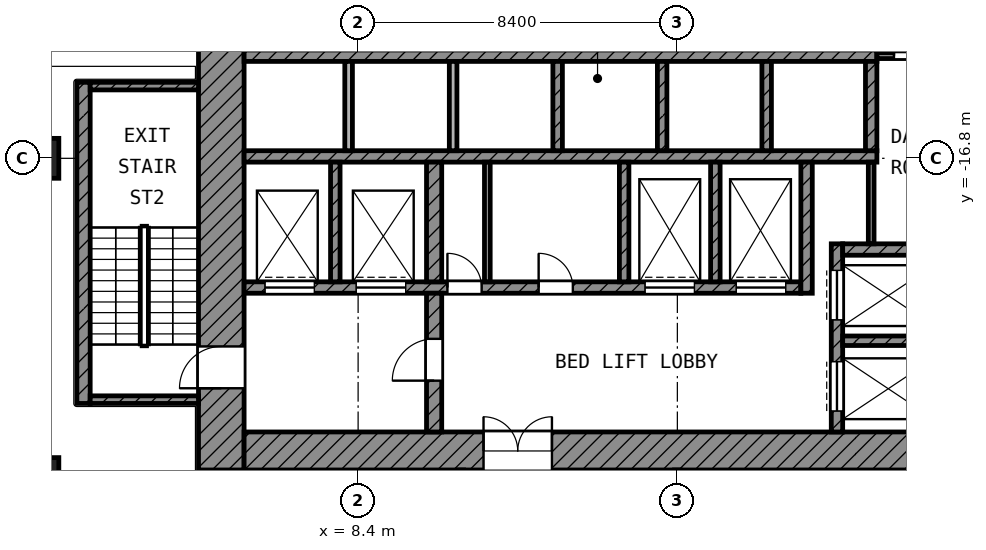
"""IFC4 building model, lengths in metres.
Left out: names, types, materials, properties, quantities, classifications, styles, units other than length and angle.
Written with IfcOpenShell. Run it as: python <this file> out.ifc"""

import sys

from ifc_helpers import new_model, si_unit, direction, frame, frame_2d, origin, origin_2d, place, context, subcontext, project, spatial, rectangle, extrude, element, fill, save


model = new_model("IFC4")
c1 = context("Model", 3, precision=1e-05, world=origin(), true_north=direction((0.0, 1.0)))
c2 = subcontext(c1, "Body", "Model", "MODEL_VIEW")
j1 = project(units=[si_unit("LENGTHUNIT", "METRE"), si_unit("PLANEANGLEUNIT", "RADIAN")], contexts=[c1])
p1 = place(None, origin())
s1 = spatial("IfcSite", under=j1, at=p1, CompositionType="ELEMENT")
p2 = place(p1, origin())
s2 = spatial("IfcBuilding", under=s1, at=p2, CompositionType="ELEMENT")
p3 = place(p2, frame((0.0, 0.0, 107.2)))
s3 = spatial("IfcBuildingStorey", under=s2, at=p3, CompositionType="ELEMENT", Elevation=107.2)
for number, where, z_axis, x_axis in (
    (1, (0.0, -16.8, 0.0), (0.0, 0.0, 1.0), (1.0, 0.0, 0.0)),
    (2, (0.0, -25.2, 0.0), (0.0, 0.0, 1.0), (1.0, 0.0, 0.0)),
):
    element("IfcColumn", number, at=place(p3, frame(where, z_axis=z_axis, x_axis=x_axis)), inside=s3, PredefinedType="COLUMN", context=c2, shape_type="SweptSolid", body=[
        extrude(rectangle(XDim=1.05, YDim=1.05, at=origin_2d()), origin(), (0.0, 0.0, 1.0), 4.2),
    ])
p4 = place(p3, frame((4.8, -25.0, 0.0), z_axis=(0.0, 0.0, 1.0), x_axis=(0.0, 1.0, 0.0)))
e3 = element("IfcWall", 3, at=p4, inside=s3, PredefinedType="SHEAR", context=c2, shape_type="SweptSolid", body=[
    extrude(rectangle(XDim=19.6, YDim=1.2, at=frame_2d((9.8, 0.0))), origin(), (0.0, 0.0, 1.0), 3.6),
])
p5 = place(p4, frame((11.45, 0.0, 0.0)))
e4 = element("IfcOpeningElement", 4, at=p5, cuts=e3, PredefinedType="OPENING", context=c2, shape_type="SweptSolid", body=[
    extrude(rectangle(XDim=1.1, YDim=2.1, at=frame_2d((0.55, 1.05))), frame((0.0, 0.61, 0.0), z_axis=(0.0, -1.0, 0.0), x_axis=(1.0, 0.0, 0.0)), (0.0, 0.0, 1.0), 1.22),
])
p6 = place(p4, frame((2.15, 0.0, 0.0)))
e5 = element("IfcOpeningElement", 5, at=p6, cuts=e3, PredefinedType="OPENING", context=c2, shape_type="SweptSolid", body=[
    extrude(rectangle(XDim=1.1, YDim=2.1, at=frame_2d((0.55, 1.05))), frame((0.0, 0.61, 0.0), z_axis=(0.0, -1.0, 0.0), x_axis=(1.0, 0.0, 0.0)), (0.0, 0.0, 1.0), 1.22),
])
p7 = place(p3, frame((5.4, -24.5, 0.0), z_axis=(0.0, 0.0, 1.0), x_axis=(1.0, 0.0, 0.0)))
e6 = element("IfcWall", 6, at=p7, inside=s3, PredefinedType="SHEAR", context=c2, shape_type="SweptSolid", body=[
    extrude(rectangle(XDim=18.6, YDim=1.0, at=frame_2d((9.3, 0.0))), origin(), (0.0, 0.0, 1.0), 3.6),
])
p8 = place(p7, frame((6.3, 0.0, 0.0)))
e7 = element("IfcOpeningElement", 7, at=p8, cuts=e6, PredefinedType="OPENING", context=c2, shape_type="SweptSolid", body=[
    extrude(rectangle(XDim=1.8, YDim=2.1, at=frame_2d((0.9, 1.05))), frame((0.0, 0.51, 0.0), z_axis=(0.0, -1.0, 0.0), x_axis=(1.0, 0.0, 0.0)), (0.0, 0.0, 1.0), 1.02),
])
for number, where, z_axis, x_axis in (
    (8, (5.4, -14.1, 0.0), (0.0, 0.0, 1.0), (1.0, 0.0, 0.0)),
    (9, (5.4, -16.75, 0.0), (0.0, 0.0, 1.0), (1.0, 0.0, 0.0)),
):
    element("IfcWall", number, at=place(p3, frame(where, z_axis=z_axis, x_axis=x_axis)), inside=s3, PredefinedType="SHEAR", context=c2, shape_type="SweptSolid", body=[
        extrude(rectangle(XDim=16.65, YDim=0.3, at=frame_2d((8.325, 0.0))), origin(), (0.0, 0.0, 1.0), 3.6),
    ])
p9 = place(p3, frame((5.4, -20.2, 0.0), z_axis=(0.0, 0.0, 1.0), x_axis=(1.0, 0.0, 0.0)))
e10 = element("IfcWall", 10, at=p9, inside=s3, PredefinedType="SHEAR", context=c2, shape_type="SweptSolid", body=[
    extrude(rectangle(XDim=14.65, YDim=0.3, at=frame_2d((7.325, 0.0))), origin(), (0.0, 0.0, 1.0), 3.6),
])
p10 = place(p9, frame((10.55, 0.0, 0.0)))
e11 = element("IfcOpeningElement", 11, at=p10, cuts=e10, PredefinedType="OPENING", context=c2, shape_type="SweptSolid", body=[
    extrude(rectangle(XDim=1.3, YDim=2.1, at=frame_2d((0.65, 1.05))), frame((0.0, 0.16, 0.0), z_axis=(0.0, -1.0, 0.0), x_axis=(1.0, 0.0, 0.0)), (0.0, 0.0, 1.0), 0.32),
])
p11 = place(p9, frame((12.95, 0.0, 0.0)))
e12 = element("IfcOpeningElement", 12, at=p11, cuts=e10, PredefinedType="OPENING", context=c2, shape_type="SweptSolid", body=[
    extrude(rectangle(XDim=1.3, YDim=2.1, at=frame_2d((0.65, 1.05))), frame((0.0, 0.16, 0.0), z_axis=(0.0, -1.0, 0.0), x_axis=(1.0, 0.0, 0.0)), (0.0, 0.0, 1.0), 0.32),
])
p12 = place(p9, frame((0.55, 0.0, 0.0)))
e13 = element("IfcOpeningElement", 13, at=p12, cuts=e10, PredefinedType="OPENING", context=c2, shape_type="SweptSolid", body=[
    extrude(rectangle(XDim=1.3, YDim=2.1, at=frame_2d((0.65, 1.05))), frame((0.0, 0.16, 0.0), z_axis=(0.0, -1.0, 0.0), x_axis=(1.0, 0.0, 0.0)), (0.0, 0.0, 1.0), 0.32),
])
p13 = place(p9, frame((2.95, 0.0, 0.0)))
e14 = element("IfcOpeningElement", 14, at=p13, cuts=e10, PredefinedType="OPENING", context=c2, shape_type="SweptSolid", body=[
    extrude(rectangle(XDim=1.3, YDim=2.1, at=frame_2d((0.65, 1.05))), frame((0.0, 0.16, 0.0), z_axis=(0.0, -1.0, 0.0), x_axis=(1.0, 0.0, 0.0)), (0.0, 0.0, 1.0), 0.32),
])
p14 = place(p9, frame((5.35, 0.0, 0.0)))
e15 = element("IfcOpeningElement", 15, at=p14, cuts=e10, PredefinedType="OPENING", context=c2, shape_type="SweptSolid", body=[
    extrude(rectangle(XDim=0.9, YDim=2.1, at=frame_2d((0.45, 1.05))), frame((0.0, 0.16, 0.0), z_axis=(0.0, -1.0, 0.0), x_axis=(1.0, 0.0, 0.0)), (0.0, 0.0, 1.0), 0.32),
])
p15 = place(p9, frame((7.75, 0.0, 0.0)))
e16 = element("IfcOpeningElement", 16, at=p15, cuts=e10, PredefinedType="OPENING", context=c2, shape_type="SweptSolid", body=[
    extrude(rectangle(XDim=0.9, YDim=2.1, at=frame_2d((0.45, 1.05))), frame((0.0, 0.16, 0.0), z_axis=(0.0, -1.0, 0.0), x_axis=(1.0, 0.0, 0.0)), (0.0, 0.0, 1.0), 0.32),
])
p16 = place(p3, frame((10.4, -24.0, 0.0), z_axis=(0.0, 0.0, 1.0), x_axis=(0.0, 1.0, 0.0)))
e17 = element("IfcWall", 17, at=p16, inside=s3, PredefinedType="SHEAR", context=c2, shape_type="SweptSolid", body=[
    extrude(rectangle(XDim=3.65, YDim=0.4, at=frame_2d((1.825, 0.0))), origin(), (0.0, 0.0, 1.0), 3.6),
])
p17 = place(p16, frame((1.35, 0.0, 0.0)))
e18 = element("IfcOpeningElement", 18, at=p17, cuts=e17, PredefinedType="OPENING", context=c2, shape_type="SweptSolid", body=[
    extrude(rectangle(XDim=1.1, YDim=2.1, at=frame_2d((0.55, 1.05))), frame((0.0, 0.21, 0.0), z_axis=(0.0, -1.0, 0.0), x_axis=(1.0, 0.0, 0.0)), (0.0, 0.0, 1.0), 0.42),
])
p18 = place(p3, frame((10.4, -20.05, 0.0), z_axis=(0.0, 0.0, 1.0), x_axis=(0.0, 1.0, 0.0)))
e19 = element("IfcWall", 19, at=p18, inside=s3, PredefinedType="SHEAR", context=c2, shape_type="SweptSolid", body=[
    extrude(rectangle(XDim=3.15, YDim=0.4, at=frame_2d((1.575, 0.0))), origin(), (0.0, 0.0, 1.0), 3.6),
])
p19 = place(p3, frame((20.2, -20.35, 0.0), z_axis=(0.0, 0.0, 1.0), x_axis=(0.0, 1.0, 0.0)))
e20 = element("IfcWall", 20, at=p19, inside=s3, PredefinedType="SHEAR", context=c2, shape_type="SweptSolid", body=[
    extrude(rectangle(XDim=3.45, YDim=0.3, at=frame_2d((1.725, 0.0))), origin(), (0.0, 0.0, 1.0), 3.6),
])
p20 = place(p3, frame((21.9, -16.6, 0.0), z_axis=(0.0, 0.0, 1.0), x_axis=(0.0, 1.0, 0.0)))
e21 = element("IfcWall", 21, at=p20, inside=s3, PredefinedType="SHEAR", context=c2, shape_type="SweptSolid", body=[
    extrude(rectangle(XDim=2.35, YDim=0.3, at=frame_2d((1.175, 0.0))), origin(), (0.0, 0.0, 1.0), 3.6),
])
p21 = place(p3, frame((21.15, -19.2, 0.0), z_axis=(0.0, 0.0, 1.0), x_axis=(1.0, 0.0, 0.0)))
e22 = element("IfcWall", 22, at=p21, inside=s3, PredefinedType="SHEAR", context=c2, shape_type="SweptSolid", body=[
    extrude(rectangle(XDim=2.85, YDim=0.3, at=frame_2d((1.425, 0.0))), origin(), (0.0, 0.0, 1.0), 3.6),
])
p22 = place(p3, frame((21.0, -24.0, 0.0), z_axis=(0.0, 0.0, 1.0), x_axis=(0.0, 1.0, 0.0)))
e23 = element("IfcWall", 23, at=p22, inside=s3, PredefinedType="SHEAR", context=c2, shape_type="SweptSolid", body=[
    extrude(rectangle(XDim=4.95, YDim=0.3, at=frame_2d((2.475, 0.0))), origin(), (0.0, 0.0, 1.0), 3.6),
])
p23 = place(p22, frame((2.95, 0.0, 0.0)))
e24 = element("IfcOpeningElement", 24, at=p23, cuts=e23, PredefinedType="OPENING", context=c2, shape_type="SweptSolid", body=[
    extrude(rectangle(XDim=1.3, YDim=2.1, at=frame_2d((0.65, 1.05))), frame((0.0, 0.16, 0.0), z_axis=(0.0, -1.0, 0.0), x_axis=(1.0, 0.0, 0.0)), (0.0, 0.0, 1.0), 0.32),
])
p24 = place(p22, frame((0.55, 0.0, 0.0)))
e25 = element("IfcOpeningElement", 25, at=p24, cuts=e23, PredefinedType="OPENING", context=c2, shape_type="SweptSolid", body=[
    extrude(rectangle(XDim=1.3, YDim=2.1, at=frame_2d((0.65, 1.05))), frame((0.0, 0.16, 0.0), z_axis=(0.0, -1.0, 0.0), x_axis=(1.0, 0.0, 0.0)), (0.0, 0.0, 1.0), 0.32),
])
p25 = place(p3, frame((21.15, -21.6, 0.0), z_axis=(0.0, 0.0, 1.0), x_axis=(1.0, 0.0, 0.0)))
e26 = element("IfcWall", 26, at=p25, inside=s3, PredefinedType="SHEAR", context=c2, shape_type="SweptSolid", body=[
    extrude(rectangle(XDim=2.85, YDim=0.25, at=frame_2d((1.425, 0.0))), origin(), (0.0, 0.0, 1.0), 3.6),
])
for number, where, z_axis, x_axis in (
    (27, (7.8, -20.05, 0.0), (0.0, 0.0, 1.0), (0.0, 1.0, 0.0)),
    (28, (15.4, -20.05, 0.0), (0.0, 0.0, 1.0), (0.0, 1.0, 0.0)),
    (29, (17.8, -20.05, 0.0), (0.0, 0.0, 1.0), (0.0, 1.0, 0.0)),
):
    element("IfcWall", number, at=place(p3, frame(where, z_axis=z_axis, x_axis=x_axis)), inside=s3, PredefinedType="SHEAR", context=c2, shape_type="SweptSolid", body=[
        extrude(rectangle(XDim=3.15, YDim=0.25, at=frame_2d((1.575, 0.0))), origin(), (0.0, 0.0, 1.0), 3.6),
    ])
for number, where, z_axis, x_axis in (
    (30, (8.15, -16.6, 0.0), (0.0, 0.0, 1.0), (0.0, 1.0, 0.0)),
    (31, (10.9, -16.6, 0.0), (0.0, 0.0, 1.0), (0.0, 1.0, 0.0)),
):
    element("IfcWall", number, at=place(p3, frame(where, z_axis=z_axis, x_axis=x_axis)), inside=s3, PredefinedType="PARTITIONING", context=c2, shape_type="SweptSolid", body=[
        extrude(rectangle(XDim=2.35, YDim=0.2, at=frame_2d((1.175, 0.0))), origin(), (0.0, 0.0, 1.0), 3.6),
    ])
for number, where, z_axis, x_axis in (
    (32, (13.65, -16.6, 0.0), (0.0, 0.0, 1.0), (0.0, 1.0, 0.0)),
    (33, (16.4, -16.6, 0.0), (0.0, 0.0, 1.0), (0.0, 1.0, 0.0)),
    (34, (19.15, -16.6, 0.0), (0.0, 0.0, 1.0), (0.0, 1.0, 0.0)),
):
    element("IfcWall", number, at=place(p3, frame(where, z_axis=z_axis, x_axis=x_axis)), inside=s3, PredefinedType="SHEAR", context=c2, shape_type="SweptSolid", body=[
        extrude(rectangle(XDim=2.35, YDim=0.25, at=frame_2d((1.175, 0.0))), origin(), (0.0, 0.0, 1.0), 3.6),
    ])
p26 = place(p3, frame((21.9, -19.05, 0.0), z_axis=(0.0, 0.0, 1.0), x_axis=(0.0, 1.0, 0.0)))
e35 = element("IfcWall", 35, at=p26, inside=s3, PredefinedType="PARTITIONING", context=c2, shape_type="SweptSolid", body=[
    extrude(rectangle(XDim=2.15, YDim=0.15, at=frame_2d((1.075, 0.0))), origin(), (0.0, 0.0, 1.0), 3.6),
])
p27 = place(p3, frame((22.05, -14.1, 0.0), z_axis=(0.0, 0.0, 1.0), x_axis=(1.0, 0.0, 0.0)))
e36 = element("IfcWall", 36, at=p27, inside=s3, PredefinedType="PARTITIONING", context=c2, shape_type="SweptSolid", body=[
    extrude(rectangle(XDim=1.95, YDim=0.15, at=frame_2d((0.975, 0.0))), origin(), (0.0, 0.0, 1.0), 3.6),
])
p28 = place(p27, frame((0.45, 0.0, 0.0)))
e37 = element("IfcOpeningElement", 37, at=p28, cuts=e36, PredefinedType="OPENING", context=c2, shape_type="SweptSolid", body=[
    extrude(rectangle(XDim=0.9, YDim=2.1, at=frame_2d((0.45, 1.05))), frame((0.0, 0.085, 0.0), z_axis=(0.0, -1.0, 0.0), x_axis=(1.0, 0.0, 0.0)), (0.0, 0.0, 1.0), 0.17),
])
p29 = place(p3, frame((11.8, -20.05, 0.0), z_axis=(0.0, 0.0, 1.0), x_axis=(0.0, 1.0, 0.0)))
e38 = element("IfcWall", 38, at=p29, inside=s3, PredefinedType="PARTITIONING", context=c2, shape_type="SweptSolid", body=[
    extrude(rectangle(XDim=3.15, YDim=0.15, at=frame_2d((1.575, 0.0))), origin(), (0.0, 0.0, 1.0), 3.6),
])
p30 = place(p3, frame((1.175, -23.25, 0.0), z_axis=(0.0, 0.0, 1.0), x_axis=(0.0, 1.0, 0.0)))
e39 = element("IfcWall", 39, at=p30, inside=s3, PredefinedType="SHEAR", context=c2, shape_type="SweptSolid", body=[
    extrude(rectangle(XDim=8.45, YDim=0.35, at=frame_2d((4.225, 0.0))), origin(), (0.0, 0.0, 1.0), 3.6),
])
for number, where, z_axis, x_axis in (
    (40, (1.35, -14.9, 0.0), (0.0, 0.0, 1.0), (1.0, 0.0, 0.0)),
    (41, (1.35, -23.15, 0.0), (0.0, 0.0, 1.0), (1.0, 0.0, 0.0)),
):
    element("IfcWall", number, at=place(p3, frame(where, z_axis=z_axis, x_axis=x_axis)), inside=s3, PredefinedType="SHEAR", context=c2, shape_type="SweptSolid", body=[
        extrude(rectangle(XDim=2.85, YDim=0.2, at=frame_2d((1.425, 0.0))), origin(), (0.0, 0.0, 1.0), 3.6),
    ])
p31 = place(p23, origin())
e42 = element("IfcDoor", 42, at=p31, inside=s3, OperationType="DOUBLE_DOOR_SLIDING", PredefinedType="DOOR", context=c2, shape_type="SweptSolid", body=[
    extrude(rectangle(XDim=1.3, YDim=2.1, at=frame_2d((0.65, 1.05))), frame((0.0, 0.025, 0.0), z_axis=(0.0, -1.0, 0.0), x_axis=(1.0, 0.0, 0.0)), (0.0, 0.0, 1.0), 0.05),
])
fill(e24, e42)
p32 = place(p24, origin())
e43 = element("IfcDoor", 43, at=p32, inside=s3, OperationType="DOUBLE_DOOR_SLIDING", PredefinedType="DOOR", context=c2, shape_type="SweptSolid", body=[
    extrude(rectangle(XDim=1.3, YDim=2.1, at=frame_2d((0.65, 1.05))), frame((0.0, 0.025, 0.0), z_axis=(0.0, -1.0, 0.0), x_axis=(1.0, 0.0, 0.0)), (0.0, 0.0, 1.0), 0.05),
])
fill(e25, e43)
p33 = place(p10, origin())
e44 = element("IfcDoor", 44, at=p33, inside=s3, OperationType="DOUBLE_DOOR_SLIDING", PredefinedType="DOOR", context=c2, shape_type="SweptSolid", body=[
    extrude(rectangle(XDim=1.3, YDim=2.1, at=frame_2d((0.65, 1.05))), frame((0.0, 0.025, 0.0), z_axis=(0.0, -1.0, 0.0), x_axis=(1.0, 0.0, 0.0)), (0.0, 0.0, 1.0), 0.05),
])
fill(e11, e44)
p34 = place(p11, origin())
e45 = element("IfcDoor", 45, at=p34, inside=s3, OperationType="DOUBLE_DOOR_SLIDING", PredefinedType="DOOR", context=c2, shape_type="SweptSolid", body=[
    extrude(rectangle(XDim=1.3, YDim=2.1, at=frame_2d((0.65, 1.05))), frame((0.0, 0.025, 0.0), z_axis=(0.0, -1.0, 0.0), x_axis=(1.0, 0.0, 0.0)), (0.0, 0.0, 1.0), 0.05),
])
fill(e12, e45)
p35 = place(p12, origin())
e46 = element("IfcDoor", 46, at=p35, inside=s3, OperationType="DOUBLE_DOOR_SLIDING", PredefinedType="DOOR", context=c2, shape_type="SweptSolid", body=[
    extrude(rectangle(XDim=1.3, YDim=2.1, at=frame_2d((0.65, 1.05))), frame((0.0, 0.025, 0.0), z_axis=(0.0, -1.0, 0.0), x_axis=(1.0, 0.0, 0.0)), (0.0, 0.0, 1.0), 0.05),
])
fill(e13, e46)
p36 = place(p13, origin())
e47 = element("IfcDoor", 47, at=p36, inside=s3, OperationType="DOUBLE_DOOR_SLIDING", PredefinedType="DOOR", context=c2, shape_type="SweptSolid", body=[
    extrude(rectangle(XDim=1.3, YDim=2.1, at=frame_2d((0.65, 1.05))), frame((0.0, 0.025, 0.0), z_axis=(0.0, -1.0, 0.0), x_axis=(1.0, 0.0, 0.0)), (0.0, 0.0, 1.0), 0.05),
])
fill(e14, e47)
p37 = place(p6, origin())
e48 = element("IfcDoor", 48, at=p37, inside=s3, OperationType="SINGLE_SWING_LEFT", PredefinedType="DOOR", context=c2, shape_type="SweptSolid", body=[
    extrude(rectangle(XDim=1.1, YDim=2.1, at=frame_2d((0.55, 1.05))), frame((0.0, 0.025, 0.0), z_axis=(0.0, -1.0, 0.0), x_axis=(1.0, 0.0, 0.0)), (0.0, 0.0, 1.0), 0.05),
])
fill(e5, e48)
p38 = place(p17, origin())
e49 = element("IfcDoor", 49, at=p38, inside=s3, OperationType="SINGLE_SWING_LEFT", PredefinedType="DOOR", context=c2, shape_type="SweptSolid", body=[
    extrude(rectangle(XDim=1.1, YDim=2.1, at=frame_2d((0.55, 1.05))), frame((0.0, 0.025, 0.0), z_axis=(0.0, -1.0, 0.0), x_axis=(1.0, 0.0, 0.0)), (0.0, 0.0, 1.0), 0.05),
])
fill(e18, e49)
p39 = place(p8, origin())
e50 = element("IfcDoor", 50, at=p39, inside=s3, OperationType="DOUBLE_DOOR_SINGLE_SWING", PredefinedType="DOOR", context=c2, shape_type="SweptSolid", body=[
    extrude(rectangle(XDim=1.8, YDim=2.1, at=frame_2d((0.9, 1.05))), frame((0.0, 0.025, 0.0), z_axis=(0.0, -1.0, 0.0), x_axis=(1.0, 0.0, 0.0)), (0.0, 0.0, 1.0), 0.05),
])
fill(e7, e50)
p40 = place(p28, origin())
e51 = element("IfcDoor", 51, at=p40, inside=s3, OperationType="SINGLE_SWING_LEFT", PredefinedType="DOOR", context=c2, shape_type="SweptSolid", body=[
    extrude(rectangle(XDim=0.9, YDim=2.1, at=frame_2d((0.45, 1.05))), frame((0.0, 0.025, 0.0), z_axis=(0.0, -1.0, 0.0), x_axis=(1.0, 0.0, 0.0)), (0.0, 0.0, 1.0), 0.05),
])
fill(e37, e51)
p41 = place(p14, origin())
e52 = element("IfcDoor", 52, at=p41, inside=s3, OperationType="SINGLE_SWING_LEFT", PredefinedType="DOOR", context=c2, shape_type="SweptSolid", body=[
    extrude(rectangle(XDim=0.9, YDim=2.1, at=frame_2d((0.45, 1.05))), frame((0.0, 0.025, 0.0), z_axis=(0.0, -1.0, 0.0), x_axis=(1.0, 0.0, 0.0)), (0.0, 0.0, 1.0), 0.05),
])
fill(e15, e52)
p42 = place(p15, origin())
e53 = element("IfcDoor", 53, at=p42, inside=s3, OperationType="SINGLE_SWING_LEFT", PredefinedType="DOOR", context=c2, shape_type="SweptSolid", body=[
    extrude(rectangle(XDim=0.9, YDim=2.1, at=frame_2d((0.45, 1.05))), frame((0.0, 0.025, 0.0), z_axis=(0.0, -1.0, 0.0), x_axis=(1.0, 0.0, 0.0)), (0.0, 0.0, 1.0), 0.05),
])
fill(e16, e53)
save(model, sys.argv[1])
